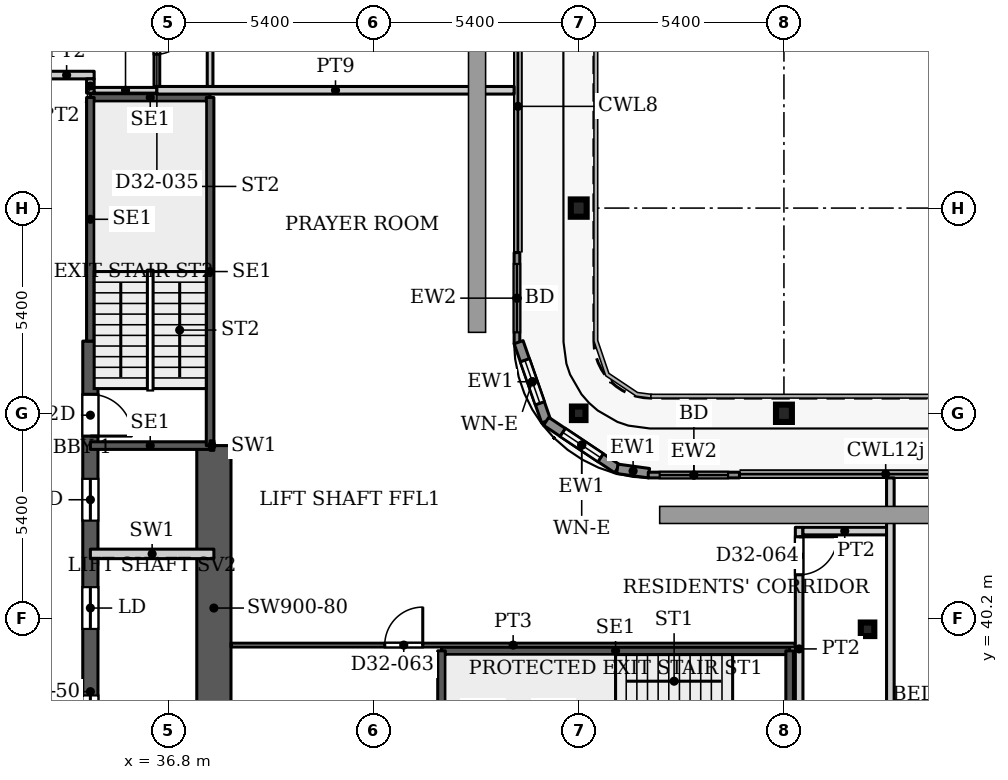
"""IFC4 building model, lengths in metres.
Left out: names, types, materials, properties, quantities, classifications, styles, units other than length and angle.
Written with IfcOpenShell. Run it as: python <this file> out.ifc"""

import sys

from ifc_helpers import new_model, si_unit, direction, frame, frame_2d, origin, origin_2d, place, context, subcontext, project, spatial, rectangle, hollow_rectangle, i_section, extrude, source, transform, mapped, element, fill, save


model = new_model("IFC4")
c1 = context("Model", 3, precision=1e-05, world=origin(), true_north=direction((0.0, 1.0)))
c2 = subcontext(c1, "Body", "Model", "MODEL_VIEW")
j1 = project(units=[si_unit("LENGTHUNIT", "METRE"), si_unit("PLANEANGLEUNIT", "RADIAN")], contexts=[c1])
p1 = place(None, origin())
s1 = spatial("IfcSite", under=j1, at=p1, CompositionType="ELEMENT")
p2 = place(p1, origin())
s2 = spatial("IfcBuilding", under=s1, at=p2, CompositionType="ELEMENT")
p3 = place(p2, frame((0.0, 0.0, 140.9)))
s3 = spatial("IfcBuildingStorey", under=s2, at=p3, CompositionType="ELEMENT", Elevation=140.9)
for number, where, z_axis, x_axis in (
    (1, (53.0, 45.6, 0.0), (0.0, 0.0, 1.0), (1.0, 0.0, 0.0)),
    (2, (47.6, 51.0, 0.0), (0.0, 0.0, 1.0), (1.0, 0.0, 0.0)),
):
    element("IfcColumn", number, at=place(p3, frame(where, z_axis=z_axis, x_axis=x_axis)), inside=s3, PredefinedType="COLUMN", context=c2, shape_type="SweptSolid", body=[
        extrude(i_section(OverallWidth=0.418, OverallDepth=0.455, WebThickness=0.042, FlangeThickness=0.068, FilletRadius=0.014, at=origin_2d()), origin(), (0.0, 0.0, 1.0), 3.9),
    ])
for number, where, z_axis, x_axis in (
    (3, (55.2, 39.916, 0.0), (0.0, 0.0, 1.0), (1.0, 0.0, 0.0)),
    (4, (47.6, 45.6, 0.0), (0.0, 0.0, 1.0), (1.0, 0.0, 0.0)),
):
    element("IfcColumn", number, at=place(p3, frame(where, z_axis=z_axis, x_axis=x_axis)), inside=s3, PredefinedType="COLUMN", context=c2, shape_type="SweptSolid", body=[
        extrude(hollow_rectangle(XDim=0.356, YDim=0.356, WallThickness=0.016, InnerFilletRadius=0.016, OuterFilletRadius=0.032, at=origin_2d()), origin(), (0.0, 0.0, 1.0), 3.9),
    ])
p4 = place(p3, frame((34.75, 29.05, 0.0), z_axis=(0.0, 0.0, 1.0), x_axis=(0.0, 1.0, 0.0)))
e5 = element("IfcWall", 5, at=p4, inside=s3, PredefinedType="SHEAR", context=c2, shape_type="SweptSolid", body=[
    extrude(rectangle(XDim=18.45, YDim=0.4, at=frame_2d((9.225, 0.0))), origin(), (0.0, 0.0, 1.0), 3.9),
])
p5 = place(p4, frame((8.025, 0.0, 0.0)))
e6 = element("IfcOpeningElement", 6, at=p5, cuts=e5, PredefinedType="OPENING", context=c2, shape_type="SweptSolid", body=[
    extrude(rectangle(XDim=1.1, YDim=2.2, at=frame_2d((0.55, 1.1))), frame((0.0, 0.21, 0.0), z_axis=(0.0, -1.0, 0.0), x_axis=(1.0, 0.0, 0.0)), (0.0, 0.0, 1.0), 0.42),
])
p6 = place(p4, frame((10.875, 0.0, 0.0)))
e7 = element("IfcOpeningElement", 7, at=p6, cuts=e5, PredefinedType="OPENING", context=c2, shape_type="SweptSolid", body=[
    extrude(rectangle(XDim=1.1, YDim=2.2, at=frame_2d((0.55, 1.1))), frame((0.0, 0.21, 0.0), z_axis=(0.0, -1.0, 0.0), x_axis=(1.0, 0.0, 0.0)), (0.0, 0.0, 1.0), 0.42),
])
p7 = place(p4, frame((13.725, 0.0, 0.0)))
e8 = element("IfcOpeningElement", 8, at=p7, cuts=e5, PredefinedType="OPENING", context=c2, shape_type="SweptSolid", body=[
    extrude(rectangle(XDim=1.1, YDim=2.2, at=frame_2d((0.55, 1.1))), frame((0.0, 0.21, 0.0), z_axis=(0.0, -1.0, 0.0), x_axis=(1.0, 0.0, 0.0)), (0.0, 0.0, 1.0), 0.42),
])
p8 = place(p4, frame((15.95, 0.0, 0.0)))
e9 = element("IfcOpeningElement", 9, at=p8, cuts=e5, PredefinedType="OPENING", context=c2, shape_type="SweptSolid", body=[
    extrude(rectangle(XDim=1.1, YDim=2.2, at=frame_2d((0.55, 1.1))), frame((0.0, 0.21, 0.0), z_axis=(0.0, -1.0, 0.0), x_axis=(1.0, 0.0, 0.0)), (0.0, 0.0, 1.0), 0.42),
])
p9 = place(p3, frame((38.0, 36.2, 0.0), z_axis=(0.0, 0.0, 1.0), x_axis=(0.0, 1.0, 0.0)))
e10 = element("IfcWall", 10, at=p9, inside=s3, PredefinedType="SHEAR", context=c2, shape_type="SweptSolid", body=[
    extrude(rectangle(XDim=8.55, YDim=0.9, at=frame_2d((4.275, 0.0))), origin(), (0.0, 0.0, 1.0), 3.9),
])
p10 = place(p3, frame((45.975, 49.83, 0.0), z_axis=(0.0, 0.0, 1.0), x_axis=(0.0, -1.0, 0.0)))
e11 = element("IfcWall", 11, at=p10, inside=s3, PredefinedType="SOLIDWALL", context=c2, shape_type="SweptSolid", body=[
    extrude(rectangle(XDim=2.4, YDim=0.15, at=frame_2d((1.2, 0.0))), origin(), (0.0, 0.0, 1.0), 3.75),
])
p11 = place(p10, frame((0.3, 0.0, 0.0)))
e12 = element("IfcOpeningElement", 12, at=p11, cuts=e11, PredefinedType="OPENING", context=c2, shape_type="SweptSolid", body=[
    extrude(rectangle(XDim=1.8, YDim=2.4, at=frame_2d((0.9, 1.2))), frame((0.0, 0.085, 0.0), z_axis=(0.0, -1.0, 0.0), x_axis=(1.0, 0.0, 0.0)), (0.0, 0.0, 1.0), 0.17),
])
p12 = place(p3, frame((46.018, 47.471, 0.0), z_axis=(0.0, 0.0, 1.0), x_axis=(0.328791208903, -0.944402637093, 0.0)))
e13 = element("IfcWall", 13, at=p12, inside=s3, PredefinedType="SOLIDWALL", context=c2, shape_type="SweptSolid", body=[
    extrude(rectangle(XDim=2.205, YDim=0.25, at=frame_2d((1.102, 0.0))), origin(), (0.0, 0.0, 1.0), 3.75),
])
p13 = place(p12, frame((0.503, 0.0, 0.6)))
e14 = element("IfcOpeningElement", 14, at=p13, cuts=e13, PredefinedType="OPENING", context=c2, shape_type="SweptSolid", body=[
    extrude(rectangle(XDim=1.2, YDim=2.1, at=frame_2d((0.6, 1.05))), frame((0.0, 0.135, 0.0), z_axis=(0.0, -1.0, 0.0), x_axis=(1.0, 0.0, 0.0)), (0.0, 0.0, 1.0), 0.27),
])
p14 = place(p3, frame((46.743, 45.389, 0.0), z_axis=(0.0, 0.0, 1.0), x_axis=(0.831449265529, -0.555600682912, 0.0)))
e15 = element("IfcWall", 15, at=p14, inside=s3, PredefinedType="SOLIDWALL", context=c2, shape_type="SweptSolid", body=[
    extrude(rectangle(XDim=2.251, YDim=0.25, at=frame_2d((1.126, 0.0))), origin(), (0.0, 0.0, 1.0), 3.75),
])
p15 = place(p14, frame((0.525, 0.0, 0.6)))
e16 = element("IfcOpeningElement", 16, at=p15, cuts=e15, PredefinedType="OPENING", context=c2, shape_type="SweptSolid", body=[
    extrude(rectangle(XDim=1.2, YDim=2.1, at=frame_2d((0.6, 1.05))), frame((0.0, 0.135, 0.0), z_axis=(0.0, -1.0, 0.0), x_axis=(1.0, 0.0, 0.0)), (0.0, 0.0, 1.0), 0.27),
])
p16 = place(p3, frame((48.615, 44.138, 0.0), z_axis=(0.0, 0.0, 1.0), x_axis=(0.990741504246, -0.135761819977, 0.0)))
e17 = element("IfcWall", 17, at=p16, inside=s3, PredefinedType="SOLIDWALL", context=c2, shape_type="SweptSolid", body=[
    extrude(rectangle(XDim=0.84, YDim=0.25, at=frame_2d((0.42, 0.0))), origin(), (0.0, 0.0, 1.0), 3.75),
])
p17 = place(p3, frame((49.43, 43.975, 0.0), z_axis=(0.0, 0.0, 1.0), x_axis=(1.0, 0.0, 0.0)))
e18 = element("IfcWall", 18, at=p17, inside=s3, PredefinedType="SOLIDWALL", context=c2, shape_type="SweptSolid", body=[
    extrude(rectangle(XDim=2.4, YDim=0.15, at=frame_2d((1.2, 0.0))), origin(), (0.0, 0.0, 1.0), 3.75),
])
p18 = place(p17, frame((0.3, 0.0, 0.0)))
e19 = element("IfcOpeningElement", 19, at=p18, cuts=e18, PredefinedType="OPENING", context=c2, shape_type="SweptSolid", body=[
    extrude(rectangle(XDim=1.8, YDim=2.4, at=frame_2d((0.9, 1.2))), frame((0.0, 0.085, 0.0), z_axis=(0.0, -1.0, 0.0), x_axis=(1.0, 0.0, 0.0)), (0.0, 0.0, 1.0), 0.17),
])
p19 = place(p3, frame((43.99, 39.35, 0.0), z_axis=(0.0, 0.0, 1.0), x_axis=(1.0, 0.0, 0.0)))
e20 = element("IfcWall", 20, at=p19, inside=s3, PredefinedType="SHEAR", context=c2, shape_type="SweptSolid", body=[
    extrude(rectangle(XDim=9.16, YDim=0.2, at=frame_2d((4.58, 0.0))), origin(), (0.0, 0.0, 1.0), 3.9),
])
for number, where, z_axis, x_axis in (
    (21, (43.99, 36.2, 0.0), (0.0, 0.0, 1.0), (0.0, 1.0, 0.0)),
    (22, (53.15, 36.2, 0.0), (0.0, 0.0, 1.0), (0.0, 1.0, 0.0)),
):
    element("IfcWall", number, at=place(p3, frame(where, z_axis=z_axis, x_axis=x_axis)), inside=s3, PredefinedType="SHEAR", context=c2, shape_type="SweptSolid", body=[
        extrude(rectangle(XDim=3.15, YDim=0.2, at=frame_2d((1.575, 0.0))), origin(), (0.0, 0.0, 1.0), 3.9),
    ])
for number, where, z_axis, x_axis in (
    (23, (34.75, 44.75, 0.0), (0.0, 0.0, 1.0), (1.0, 0.0, 0.0)),
    (24, (34.75, 53.91, 0.0), (0.0, 0.0, 1.0), (1.0, 0.0, 0.0)),
):
    element("IfcWall", number, at=place(p3, frame(where, z_axis=z_axis, x_axis=x_axis)), inside=s3, PredefinedType="SHEAR", context=c2, shape_type="SweptSolid", body=[
        extrude(rectangle(XDim=3.15, YDim=0.2, at=frame_2d((1.575, 0.0))), origin(), (0.0, 0.0, 1.0), 3.9),
    ])
p20 = place(p3, frame((34.75, 47.5, 0.0), z_axis=(0.0, 0.0, 1.0), x_axis=(0.0, 1.0, 0.0)))
e25 = element("IfcWall", 25, at=p20, inside=s3, PredefinedType="SHEAR", context=c2, shape_type="SweptSolid", body=[
    extrude(rectangle(XDim=6.41, YDim=0.2, at=frame_2d((3.205, 0.0))), origin(), (0.0, 0.0, 1.0), 3.9),
])
p21 = place(p3, frame((37.9, 44.75, 0.0), z_axis=(0.0, 0.0, 1.0), x_axis=(0.0, 1.0, 0.0)))
e26 = element("IfcWall", 26, at=p21, inside=s3, PredefinedType="SHEAR", context=c2, shape_type="SweptSolid", body=[
    extrude(rectangle(XDim=9.16, YDim=0.2, at=frame_2d((4.58, 0.0))), origin(), (0.0, 0.0, 1.0), 3.9),
])
p22 = place(p3, frame((34.75, 41.9, 0.0), z_axis=(0.0, 0.0, 1.0), x_axis=(1.0, 0.0, 0.0)))
e27 = element("IfcWall", 27, at=p22, inside=s3, PredefinedType="PARTITIONING", context=c2, shape_type="SweptSolid", body=[
    extrude(rectangle(XDim=3.25, YDim=0.25, at=frame_2d((1.625, 0.0))), origin(), (0.0, 0.0, 1.0), 3.9),
])
p23 = place(p3, frame((37.9, 44.75, 0.0), z_axis=(0.0, 0.0, 1.0), x_axis=(1.0, 0.0, 0.0)))
e28 = element("IfcWall", 28, at=p23, inside=s3, PredefinedType="PARTITIONING", context=c2, shape_type="SweptSolid", body=[
    extrude(rectangle(XDim=0.1, YDim=0.25, at=frame_2d((0.05, 0.0))), origin(), (0.0, 0.0, 1.0), 3.9),
])
p24 = place(p3, frame((33.4, 54.5, 0.0), z_axis=(0.0, 0.0, 1.0), x_axis=(1.0, 0.0, 0.0)))
e29 = element("IfcWall", 29, at=p24, inside=s3, PredefinedType="PARTITIONING", context=c2, shape_type="SweptSolid", body=[
    extrude(rectangle(XDim=1.45, YDim=0.2, at=frame_2d((0.725, 0.0))), origin(), (0.0, 0.0, 1.0), 3.6),
])
p25 = place(p3, frame((34.75, 54.025, 0.0), z_axis=(0.0, 0.0, 1.0), x_axis=(0.0, 1.0, 0.0)))
e30 = element("IfcWall", 30, at=p25, inside=s3, PredefinedType="PARTITIONING", context=c2, shape_type="SweptSolid", body=[
    extrude(rectangle(XDim=0.375, YDim=0.2, at=frame_2d((0.188, 0.0))), origin(), (0.0, 0.0, 1.0), 3.6),
])
p26 = place(p3, frame((34.85, 54.1, 0.0), z_axis=(0.0, 0.0, 1.0), x_axis=(1.0, 0.0, 0.0)))
e31 = element("IfcWall", 31, at=p26, inside=s3, PredefinedType="PARTITIONING", context=c2, shape_type="SweptSolid", body=[
    extrude(rectangle(XDim=1.65, YDim=0.15, at=frame_2d((0.825, 0.0))), origin(), (0.0, 0.0, 1.0), 3.6),
])
p27 = place(p3, frame((36.5, 54.1, 0.0), z_axis=(0.0, 0.0, 1.0), x_axis=(1.0, 0.0, 0.0)))
e32 = element("IfcWall", 32, at=p27, inside=s3, PredefinedType="PARTITIONING", context=c2, shape_type="SweptSolid", body=[
    extrude(rectangle(XDim=9.4, YDim=0.2, at=frame_2d((4.7, 0.0))), origin(), (0.0, 0.0, 1.0), 3.6),
])
p28 = place(p3, frame((36.5, 54.2, 0.0), z_axis=(0.0, 0.0, 1.0), x_axis=(0.0, 1.0, 0.0)))
e33 = element("IfcWall", 33, at=p28, inside=s3, PredefinedType="PARTITIONING", context=c2, shape_type="SweptSolid", body=[
    extrude(rectangle(XDim=11.05, YDim=0.15, at=frame_2d((5.525, 0.0))), origin(), (0.0, 0.0, 1.0), 3.6),
])
p29 = place(p28, frame((0.85, 0.0, 0.0)))
e34 = element("IfcOpeningElement", 34, at=p29, cuts=e33, PredefinedType="OPENING", context=c2, shape_type="SweptSolid", body=[
    extrude(rectangle(XDim=0.8, YDim=2.1, at=frame_2d((0.4, 1.05))), frame((0.0, 0.085, 0.0), z_axis=(0.0, -1.0, 0.0), x_axis=(1.0, 0.0, 0.0)), (0.0, 0.0, 1.0), 0.17),
])
p30 = place(p28, frame((8.35, 0.0, 0.0)))
e35 = element("IfcOpeningElement", 35, at=p30, cuts=e33, PredefinedType="OPENING", context=c2, shape_type="SweptSolid", body=[
    extrude(rectangle(XDim=0.9, YDim=2.1, at=frame_2d((0.45, 1.05))), frame((0.0, 0.085, 0.0), z_axis=(0.0, -1.0, 0.0), x_axis=(1.0, 0.0, 0.0)), (0.0, 0.0, 1.0), 0.17),
])
p31 = place(p28, frame((3.25, 0.0, 0.0)))
e36 = element("IfcOpeningElement", 36, at=p31, cuts=e33, PredefinedType="OPENING", context=c2, shape_type="SweptSolid", body=[
    extrude(rectangle(XDim=0.8, YDim=2.1, at=frame_2d((0.4, 1.05))), frame((0.0, 0.085, 0.0), z_axis=(0.0, -1.0, 0.0), x_axis=(1.0, 0.0, 0.0)), (0.0, 0.0, 1.0), 0.17),
])
p32 = place(p28, frame((5.35, 0.0, 0.0)))
e37 = element("IfcOpeningElement", 37, at=p32, cuts=e33, PredefinedType="OPENING", context=c2, shape_type="SweptSolid", body=[
    extrude(rectangle(XDim=0.8, YDim=2.1, at=frame_2d((0.4, 1.05))), frame((0.0, 0.085, 0.0), z_axis=(0.0, -1.0, 0.0), x_axis=(1.0, 0.0, 0.0)), (0.0, 0.0, 1.0), 0.17),
])
p33 = place(p3, frame((37.9, 54.2, 0.0), z_axis=(0.0, 0.0, 1.0), x_axis=(0.0, 1.0, 0.0)))
e38 = element("IfcWall", 38, at=p33, inside=s3, PredefinedType="PARTITIONING", context=c2, shape_type="SweptSolid", body=[
    extrude(rectangle(XDim=13.6, YDim=0.15, at=frame_2d((6.8, 0.0))), origin(), (0.0, 0.0, 1.0), 3.6),
])
p34 = place(p33, frame((1.25, 0.0, 0.0)))
e39 = element("IfcOpeningElement", 39, at=p34, cuts=e38, PredefinedType="OPENING", context=c2, shape_type="SweptSolid", body=[
    extrude(rectangle(XDim=0.9, YDim=2.1, at=frame_2d((0.45, 1.05))), frame((0.0, 0.085, 0.0), z_axis=(0.0, -1.0, 0.0), x_axis=(1.0, 0.0, 0.0)), (0.0, 0.0, 1.0), 0.17),
])
p35 = place(p33, frame((5.55, 0.0, 0.0)))
e40 = element("IfcOpeningElement", 40, at=p35, cuts=e38, PredefinedType="OPENING", context=c2, shape_type="SweptSolid", body=[
    extrude(rectangle(XDim=1.0, YDim=2.1, at=frame_2d((0.5, 1.05))), frame((0.0, 0.085, 0.0), z_axis=(0.0, -1.0, 0.0), x_axis=(1.0, 0.0, 0.0)), (0.0, 0.0, 1.0), 0.17),
])
p36 = place(p33, frame((11.75, 0.0, 0.0)))
e41 = element("IfcOpeningElement", 41, at=p36, cuts=e38, PredefinedType="OPENING", context=c2, shape_type="SweptSolid", body=[
    extrude(rectangle(XDim=0.9, YDim=2.1, at=frame_2d((0.45, 1.05))), frame((0.0, 0.085, 0.0), z_axis=(0.0, -1.0, 0.0), x_axis=(1.0, 0.0, 0.0)), (0.0, 0.0, 1.0), 0.17),
])
p37 = place(p3, frame((38.449, 39.5, 0.0), z_axis=(0.0, 0.0, 1.0), x_axis=(1.0, 0.0, 0.0)))
e42 = element("IfcWall", 42, at=p37, inside=s3, PredefinedType="PARTITIONING", context=c2, shape_type="SweptSolid", body=[
    extrude(rectangle(XDim=14.851, YDim=0.1, at=frame_2d((7.426, 0.0))), origin(), (0.0, 0.0, 1.0), 3.6),
])
p38 = place(p37, frame((4.047, 0.0, 0.0)))
e43 = element("IfcOpeningElement", 43, at=p38, cuts=e42, PredefinedType="OPENING", context=c2, shape_type="SweptSolid", body=[
    extrude(rectangle(XDim=1.0, YDim=2.1, at=frame_2d((0.5, 1.05))), frame((0.0, 0.06, 0.0), z_axis=(0.0, -1.0, 0.0), x_axis=(1.0, 0.0, 0.0)), (0.0, 0.0, 1.0), 0.12),
])
p39 = place(p3, frame((53.4, 36.199, 0.0), z_axis=(0.0, 0.0, 1.0), x_axis=(0.0, 1.0, 0.0)))
e44 = element("IfcWall", 44, at=p39, inside=s3, PredefinedType="PARTITIONING", context=c2, shape_type="SweptSolid", body=[
    extrude(rectangle(XDim=6.401, YDim=0.2, at=frame_2d((3.201, 0.0))), origin(), (0.0, 0.0, 1.0), 3.6),
])
p40 = place(p39, frame((5.151, 0.0, 0.0)))
e45 = element("IfcOpeningElement", 45, at=p40, cuts=e44, PredefinedType="OPENING", context=c2, shape_type="SweptSolid", body=[
    extrude(rectangle(XDim=1.0, YDim=2.1, at=frame_2d((0.5, 1.05))), frame((0.0, 0.11, 0.0), z_axis=(0.0, -1.0, 0.0), x_axis=(1.0, 0.0, 0.0)), (0.0, 0.0, 1.0), 0.22),
])
p41 = place(p3, frame((53.5, 42.5, 0.0), z_axis=(0.0, 0.0, 1.0), x_axis=(1.0, 0.0, 0.0)))
e46 = element("IfcWall", 46, at=p41, inside=s3, PredefinedType="PARTITIONING", context=c2, shape_type="SweptSolid", body=[
    extrude(rectangle(XDim=2.2, YDim=0.2, at=frame_2d((1.1, 0.0))), origin(), (0.0, 0.0, 1.0), 3.6),
])
p42 = place(p3, frame((55.8, 30.4, 0.0), z_axis=(0.0, 0.0, 1.0), x_axis=(0.0, 1.0, 0.0)))
e47 = element("IfcWall", 47, at=p42, inside=s3, PredefinedType="PARTITIONING", context=c2, shape_type="SweptSolid", body=[
    extrude(rectangle(XDim=13.5, YDim=0.2, at=frame_2d((6.75, 0.0))), origin(), (0.0, 0.0, 1.0), 3.6),
])
m1 = source(origin(), c2, "Body", "SweptSolid", [
    extrude(rectangle(XDim=1.8, YDim=2.4, at=frame_2d((0.9, 1.2))), frame((0.0, 0.025, 0.0), z_axis=(0.0, -1.0, 0.0), x_axis=(1.0, 0.0, 0.0)), (0.0, 0.0, 1.0), 0.05),
])
p43 = place(p11, origin())
e48 = element("IfcDoor", 48, at=p43, inside=s3, OperationType="SLIDING_TO_LEFT", PredefinedType="DOOR", context=c2, shape_type="MappedRepresentation", body=[
    mapped(m1, transform((0.0, 0.0, 0.0), x_axis=(1.0, 0.0, 0.0), y_axis=(0.0, 1.0, 0.0), z_axis=(0.0, 0.0, 1.0), scale=1.0)),
])
fill(e12, e48)
m2 = source(origin(), c2, "Body", "SweptSolid", [
    extrude(rectangle(XDim=1.2, YDim=2.1, at=frame_2d((0.6, 1.05))), frame((0.0, 0.03, 0.0), z_axis=(0.0, -1.0, 0.0), x_axis=(1.0, 0.0, 0.0)), (0.0, 0.0, 1.0), 0.06),
])
p44 = place(p13, origin())
e49 = element("IfcWindow", 49, at=p44, inside=s3, PartitioningType="SINGLE_PANEL", PredefinedType="WINDOW", context=c2, shape_type="MappedRepresentation", body=[
    mapped(m2, transform((0.0, 0.0, 0.0), x_axis=(1.0, 0.0, 0.0), y_axis=(0.0, 1.0, 0.0), z_axis=(0.0, 0.0, 1.0), scale=1.0)),
])
fill(e14, e49)
p45 = place(p15, origin())
e50 = element("IfcWindow", 50, at=p45, inside=s3, PartitioningType="SINGLE_PANEL", PredefinedType="WINDOW", context=c2, shape_type="MappedRepresentation", body=[
    mapped(m2, transform((0.0, 0.0, 0.0), x_axis=(1.0, 0.0, 0.0), y_axis=(0.0, 1.0, 0.0), z_axis=(0.0, 0.0, 1.0), scale=1.0)),
])
fill(e16, e50)
p46 = place(p18, origin())
e51 = element("IfcDoor", 51, at=p46, inside=s3, OperationType="SLIDING_TO_LEFT", PredefinedType="DOOR", context=c2, shape_type="MappedRepresentation", body=[
    mapped(m1, transform((0.0, 0.0, 0.0), x_axis=(1.0, 0.0, 0.0), y_axis=(0.0, 1.0, 0.0), z_axis=(0.0, 0.0, 1.0), scale=1.0)),
])
fill(e19, e51)
m3 = source(origin(), c2, "Body", "SweptSolid", [
    extrude(rectangle(XDim=1.1, YDim=2.2, at=frame_2d((0.55, 1.1))), frame((0.0, 0.025, 0.0), z_axis=(0.0, -1.0, 0.0), x_axis=(1.0, 0.0, 0.0)), (0.0, 0.0, 1.0), 0.05),
])
p47 = place(p5, origin())
e52 = element("IfcDoor", 52, at=p47, inside=s3, OperationType="SLIDING_TO_LEFT", PredefinedType="DOOR", context=c2, shape_type="MappedRepresentation", body=[
    mapped(m3, transform((0.0, 0.0, 0.0), x_axis=(1.0, 0.0, 0.0), y_axis=(0.0, 1.0, 0.0), z_axis=(0.0, 0.0, 1.0), scale=1.0)),
])
fill(e6, e52)
p48 = place(p6, origin())
e53 = element("IfcDoor", 53, at=p48, inside=s3, OperationType="SLIDING_TO_LEFT", PredefinedType="DOOR", context=c2, shape_type="MappedRepresentation", body=[
    mapped(m3, transform((0.0, 0.0, 0.0), x_axis=(1.0, 0.0, 0.0), y_axis=(0.0, 1.0, 0.0), z_axis=(0.0, 0.0, 1.0), scale=1.0)),
])
fill(e7, e53)
p49 = place(p7, origin())
e54 = element("IfcDoor", 54, at=p49, inside=s3, OperationType="SLIDING_TO_LEFT", PredefinedType="DOOR", context=c2, shape_type="MappedRepresentation", body=[
    mapped(m3, transform((0.0, 0.0, 0.0), x_axis=(1.0, 0.0, 0.0), y_axis=(0.0, 1.0, 0.0), z_axis=(0.0, 0.0, 1.0), scale=1.0)),
])
fill(e8, e54)
m4 = source(origin(), c2, "Body", "SweptSolid", [
    extrude(rectangle(XDim=1.1, YDim=2.2, at=frame_2d((0.55, 1.1))), frame((0.0, 0.025, 0.0), z_axis=(0.0, -1.0, 0.0), x_axis=(1.0, 0.0, 0.0)), (0.0, 0.0, 1.0), 0.05),
])
p50 = place(p8, origin())
e55 = element("IfcDoor", 55, at=p50, inside=s3, OperationType="SINGLE_SWING_RIGHT", PredefinedType="DOOR", context=c2, shape_type="MappedRepresentation", body=[
    mapped(m4, transform((0.0, 0.0, 0.0), x_axis=(1.0, 0.0, 0.0), y_axis=(0.0, 1.0, 0.0), z_axis=(0.0, 0.0, 1.0), scale=1.0)),
])
fill(e9, e55)
m5 = source(origin(), c2, "Body", "SweptSolid", [
    extrude(rectangle(XDim=0.8, YDim=2.1, at=frame_2d((0.4, 1.05))), frame((0.0, 0.025, 0.0), z_axis=(0.0, -1.0, 0.0), x_axis=(1.0, 0.0, 0.0)), (0.0, 0.0, 1.0), 0.05),
])
p51 = place(p29, origin())
e56 = element("IfcDoor", 56, at=p51, inside=s3, OperationType="SINGLE_SWING_RIGHT", PredefinedType="DOOR", context=c2, shape_type="MappedRepresentation", body=[
    mapped(m5, transform((0.0, 0.0, 0.0), x_axis=(1.0, 0.0, 0.0), y_axis=(0.0, 1.0, 0.0), z_axis=(0.0, 0.0, 1.0), scale=1.0)),
])
fill(e34, e56)
m6 = source(origin(), c2, "Body", "SweptSolid", [
    extrude(rectangle(XDim=1.0, YDim=2.1, at=frame_2d((0.5, 1.05))), frame((0.0, 0.025, 0.0), z_axis=(0.0, -1.0, 0.0), x_axis=(1.0, 0.0, 0.0)), (0.0, 0.0, 1.0), 0.05),
])
p52 = place(p38, origin())
e57 = element("IfcDoor", 57, at=p52, inside=s3, OperationType="SINGLE_SWING_LEFT", PredefinedType="DOOR", context=c2, shape_type="MappedRepresentation", body=[
    mapped(m6, transform((0.0, 0.0, 0.0), x_axis=(1.0, 0.0, 0.0), y_axis=(0.0, 1.0, 0.0), z_axis=(0.0, 0.0, 1.0), scale=1.0)),
])
fill(e43, e57)
m7 = source(origin(), c2, "Body", "SweptSolid", [
    extrude(rectangle(XDim=1.0, YDim=2.1, at=frame_2d((0.5, 1.05))), frame((0.0, 0.025, 0.0), z_axis=(0.0, -1.0, 0.0), x_axis=(1.0, 0.0, 0.0)), (0.0, 0.0, 1.0), 0.05),
])
p53 = place(p40, origin())
e58 = element("IfcDoor", 58, at=p53, inside=s3, OperationType="SINGLE_SWING_RIGHT", PredefinedType="DOOR", context=c2, shape_type="MappedRepresentation", body=[
    mapped(m7, transform((0.0, 0.0, 0.0), x_axis=(1.0, 0.0, 0.0), y_axis=(0.0, 1.0, 0.0), z_axis=(0.0, 0.0, 1.0), scale=1.0)),
])
fill(e45, e58)
save(model, sys.argv[1])
